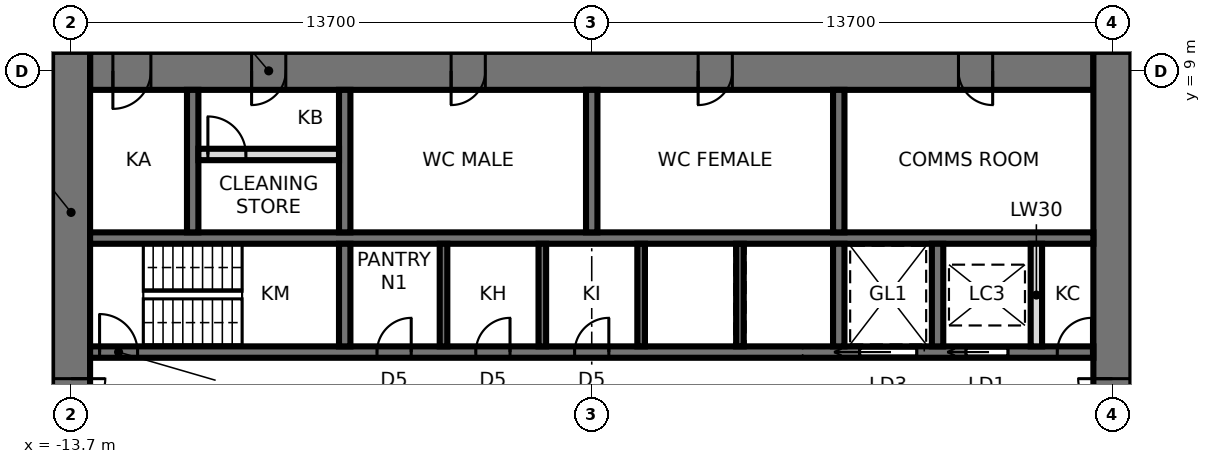
"""IFC4 building model, lengths in metres.
Left out: names, types, materials, properties, quantities, classifications, styles, units other than length and angle.
Written with IfcOpenShell. Run it as: python <this file> out.ifc"""

import sys

from ifc_helpers import new_model, si_unit, direction, frame, frame_2d, origin, place, context, subcontext, project, spatial, rectangle, extrude, element, fill, save


model = new_model("IFC4")
c1 = context("Model", 3, precision=1e-05, world=origin(), true_north=direction((0.0, 1.0)))
c2 = subcontext(c1, "Body", "Model", "MODEL_VIEW")
j1 = project(units=[si_unit("LENGTHUNIT", "METRE"), si_unit("PLANEANGLEUNIT", "RADIAN")], contexts=[c1])
p1 = place(None, origin())
s1 = spatial("IfcSite", under=j1, at=p1, CompositionType="ELEMENT")
p2 = place(p1, origin())
s2 = spatial("IfcBuilding", under=s1, at=p2, CompositionType="ELEMENT")
p3 = place(p2, frame((0.0, 0.0, 176.0)))
s3 = spatial("IfcBuildingStorey", under=s2, at=p3, CompositionType="ELEMENT", Elevation=176.0)
p4 = place(p3, frame((13.2, 9.0, 0.0), z_axis=(0.0, 0.0, 1.0), x_axis=(-1.0, 0.0, 0.0)))
e1 = element("IfcWall", 1, at=p4, inside=s3, PredefinedType="SHEAR", context=c2, shape_type="SweptSolid", body=[
    extrude(rectangle(XDim=26.4, YDim=1.0, at=frame_2d((13.2, 0.0))), origin(), (0.0, 0.0, 1.0), 3.9),
])
p5 = place(p4, frame((2.65, 0.0, 0.0)))
e2 = element("IfcOpeningElement", 2, at=p5, cuts=e1, PredefinedType="OPENING", context=c2, shape_type="SweptSolid", body=[
    extrude(rectangle(XDim=0.9, YDim=2.1, at=frame_2d((0.45, 1.05))), frame((0.0, 0.51, 0.0), z_axis=(0.0, -1.0, 0.0), x_axis=(1.0, 0.0, 0.0)), (0.0, 0.0, 1.0), 1.02),
])
p6 = place(p4, frame((9.5, 0.0, 0.0)))
e3 = element("IfcOpeningElement", 3, at=p6, cuts=e1, PredefinedType="OPENING", context=c2, shape_type="SweptSolid", body=[
    extrude(rectangle(XDim=0.9, YDim=2.1, at=frame_2d((0.45, 1.05))), frame((0.0, 0.51, 0.0), z_axis=(0.0, -1.0, 0.0), x_axis=(1.0, 0.0, 0.0)), (0.0, 0.0, 1.0), 1.02),
])
p7 = place(p4, frame((16.0, 0.0, 0.0)))
e4 = element("IfcOpeningElement", 4, at=p7, cuts=e1, PredefinedType="OPENING", context=c2, shape_type="SweptSolid", body=[
    extrude(rectangle(XDim=0.9, YDim=2.1, at=frame_2d((0.45, 1.05))), frame((0.0, 0.51, 0.0), z_axis=(0.0, -1.0, 0.0), x_axis=(1.0, 0.0, 0.0)), (0.0, 0.0, 1.0), 1.02),
])
p8 = place(p4, frame((21.25, 0.0, 0.0)))
e5 = element("IfcOpeningElement", 5, at=p8, cuts=e1, PredefinedType="OPENING", context=c2, shape_type="SweptSolid", body=[
    extrude(rectangle(XDim=0.9, YDim=2.1, at=frame_2d((0.45, 1.05))), frame((0.0, 0.51, 0.0), z_axis=(0.0, -1.0, 0.0), x_axis=(1.0, 0.0, 0.0)), (0.0, 0.0, 1.0), 1.02),
])
p9 = place(p4, frame((24.8, 0.0, 0.0)))
e6 = element("IfcOpeningElement", 6, at=p9, cuts=e1, PredefinedType="OPENING", context=c2, shape_type="SweptSolid", body=[
    extrude(rectangle(XDim=1.0, YDim=2.1, at=frame_2d((0.5, 1.05))), frame((0.0, 0.51, 0.0), z_axis=(0.0, -1.0, 0.0), x_axis=(1.0, 0.0, 0.0)), (0.0, 0.0, 1.0), 1.02),
])
p10 = place(p3, frame((13.7, -9.5, 0.0), z_axis=(0.0, 0.0, 1.0), x_axis=(0.0, 1.0, 0.0)))
e7 = element("IfcWall", 7, at=p10, inside=s3, PredefinedType="SHEAR", context=c2, shape_type="SweptSolid", body=[
    extrude(rectangle(XDim=19.0, YDim=1.0, at=frame_2d((9.5, 0.0))), origin(), (0.0, 0.0, 1.0), 3.9),
])
p11 = place(p10, frame((8.6, 0.0, 0.0)))
e8 = element("IfcOpeningElement", 8, at=p11, cuts=e7, PredefinedType="OPENING", context=c2, shape_type="SweptSolid", body=[
    extrude(rectangle(XDim=1.8, YDim=2.4, at=frame_2d((0.9, 1.2))), frame((0.0, 0.51, 0.0), z_axis=(0.0, -1.0, 0.0), x_axis=(1.0, 0.0, 0.0)), (0.0, 0.0, 1.0), 1.02),
])
p12 = place(p3, frame((-13.7, 9.5, 0.0), z_axis=(0.0, 0.0, 1.0), x_axis=(0.0, -1.0, 0.0)))
e9 = element("IfcWall", 9, at=p12, inside=s3, PredefinedType="SHEAR", context=c2, shape_type="SweptSolid", body=[
    extrude(rectangle(XDim=19.0, YDim=1.0, at=frame_2d((9.5, 0.0))), origin(), (0.0, 0.0, 1.0), 3.9),
])
p13 = place(p12, frame((8.6, 0.0, 0.0)))
e10 = element("IfcOpeningElement", 10, at=p13, cuts=e9, PredefinedType="OPENING", context=c2, shape_type="SweptSolid", body=[
    extrude(rectangle(XDim=1.8, YDim=2.4, at=frame_2d((0.9, 1.2))), frame((0.0, 0.51, 0.0), z_axis=(0.0, -1.0, 0.0), x_axis=(1.0, 0.0, 0.0)), (0.0, 0.0, 1.0), 1.02),
])
p14 = place(p3, frame((-13.2, 1.6, 0.0), z_axis=(0.0, 0.0, 1.0), x_axis=(1.0, 0.0, 0.0)))
e11 = element("IfcWall", 11, at=p14, inside=s3, PredefinedType="SHEAR", context=c2, shape_type="SweptSolid", body=[
    extrude(rectangle(XDim=26.4, YDim=0.3, at=frame_2d((13.2, 0.0))), origin(), (0.0, 0.0, 1.0), 3.9),
])
p15 = place(p14, frame((0.25, 0.0, 0.0)))
e12 = element("IfcOpeningElement", 12, at=p15, cuts=e11, PredefinedType="OPENING", context=c2, shape_type="SweptSolid", body=[
    extrude(rectangle(XDim=1.0, YDim=2.1, at=frame_2d((0.5, 1.05))), frame((0.0, 0.16, 0.0), z_axis=(0.0, -1.0, 0.0), x_axis=(1.0, 0.0, 0.0)), (0.0, 0.0, 1.0), 0.32),
])
p16 = place(p14, frame((23.05, 0.0, 0.0)))
e13 = element("IfcOpeningElement", 13, at=p16, cuts=e11, PredefinedType="OPENING", context=c2, shape_type="SweptSolid", body=[
    extrude(rectangle(XDim=1.1, YDim=2.3, at=frame_2d((0.55, 1.15))), frame((0.0, 0.16, 0.0), z_axis=(0.0, -1.0, 0.0), x_axis=(1.0, 0.0, 0.0)), (0.0, 0.0, 1.0), 0.32),
])
p17 = place(p14, frame((20.25, 0.0, 0.0)))
e14 = element("IfcOpeningElement", 14, at=p17, cuts=e11, PredefinedType="OPENING", context=c2, shape_type="SweptSolid", body=[
    extrude(rectangle(XDim=1.5, YDim=2.4, at=frame_2d((0.75, 1.2))), frame((0.0, 0.16, 0.0), z_axis=(0.0, -1.0, 0.0), x_axis=(1.0, 0.0, 0.0)), (0.0, 0.0, 1.0), 0.32),
])
p18 = place(p14, frame((7.55, 0.0, 0.0)))
e15 = element("IfcOpeningElement", 15, at=p18, cuts=e11, PredefinedType="OPENING", context=c2, shape_type="SweptSolid", body=[
    extrude(rectangle(XDim=0.9, YDim=2.1, at=frame_2d((0.45, 1.05))), frame((0.0, 0.16, 0.0), z_axis=(0.0, -1.0, 0.0), x_axis=(1.0, 0.0, 0.0)), (0.0, 0.0, 1.0), 0.32),
])
p19 = place(p14, frame((10.15, 0.0, 0.0)))
e16 = element("IfcOpeningElement", 16, at=p19, cuts=e11, PredefinedType="OPENING", context=c2, shape_type="SweptSolid", body=[
    extrude(rectangle(XDim=0.9, YDim=2.1, at=frame_2d((0.45, 1.05))), frame((0.0, 0.16, 0.0), z_axis=(0.0, -1.0, 0.0), x_axis=(1.0, 0.0, 0.0)), (0.0, 0.0, 1.0), 0.32),
])
p20 = place(p14, frame((12.75, 0.0, 0.0)))
e17 = element("IfcOpeningElement", 17, at=p20, cuts=e11, PredefinedType="OPENING", context=c2, shape_type="SweptSolid", body=[
    extrude(rectangle(XDim=0.9, YDim=2.1, at=frame_2d((0.45, 1.05))), frame((0.0, 0.16, 0.0), z_axis=(0.0, -1.0, 0.0), x_axis=(1.0, 0.0, 0.0)), (0.0, 0.0, 1.0), 0.32),
])
p21 = place(p14, frame((25.45, 0.0, 0.0)))
e18 = element("IfcOpeningElement", 18, at=p21, cuts=e11, PredefinedType="OPENING", context=c2, shape_type="SweptSolid", body=[
    extrude(rectangle(XDim=0.9, YDim=2.1, at=frame_2d((0.45, 1.05))), frame((0.0, 0.16, 0.0), z_axis=(0.0, -1.0, 0.0), x_axis=(1.0, 0.0, 0.0)), (0.0, 0.0, 1.0), 0.32),
])
p22 = place(p3, frame((-13.2, 4.6, 0.0), z_axis=(0.0, 0.0, 1.0), x_axis=(1.0, 0.0, 0.0)))
e19 = element("IfcWall", 19, at=p22, inside=s3, PredefinedType="SHEAR", context=c2, shape_type="SweptSolid", body=[
    extrude(rectangle(XDim=26.4, YDim=0.3, at=frame_2d((13.2, 0.0))), origin(), (0.0, 0.0, 1.0), 3.9),
])
p23 = place(p3, frame((-6.5, 1.75, 0.0), z_axis=(0.0, 0.0, 1.0), x_axis=(0.0, 1.0, 0.0)))
e20 = element("IfcWall", 20, at=p23, inside=s3, PredefinedType="SHEAR", context=c2, shape_type="SweptSolid", body=[
    extrude(rectangle(XDim=2.7, YDim=0.3, at=frame_2d((1.35, 0.0))), origin(), (0.0, 0.0, 1.0), 3.9),
])
p24 = place(p3, frame((-6.5, 4.75, 0.0), z_axis=(0.0, 0.0, 1.0), x_axis=(0.0, 1.0, 0.0)))
e21 = element("IfcWall", 21, at=p24, inside=s3, PredefinedType="SHEAR", context=c2, shape_type="SweptSolid", body=[
    extrude(rectangle(XDim=3.75, YDim=0.3, at=frame_2d((1.875, 0.0))), origin(), (0.0, 0.0, 1.0), 3.9),
])
p25 = place(p3, frame((6.5, 1.75, 0.0), z_axis=(0.0, 0.0, 1.0), x_axis=(0.0, 1.0, 0.0)))
e22 = element("IfcWall", 22, at=p25, inside=s3, PredefinedType="SHEAR", context=c2, shape_type="SweptSolid", body=[
    extrude(rectangle(XDim=2.7, YDim=0.3, at=frame_2d((1.35, 0.0))), origin(), (0.0, 0.0, 1.0), 3.9),
])
p26 = place(p3, frame((6.5, 4.75, 0.0), z_axis=(0.0, 0.0, 1.0), x_axis=(0.0, 1.0, 0.0)))
e23 = element("IfcWall", 23, at=p26, inside=s3, PredefinedType="SHEAR", context=c2, shape_type="SweptSolid", body=[
    extrude(rectangle(XDim=3.75, YDim=0.3, at=frame_2d((1.875, 0.0))), origin(), (0.0, 0.0, 1.0), 3.9),
])
for number, where, z_axis, x_axis in (
    (24, (-3.9, 1.75, 0.0), (0.0, 0.0, 1.0), (0.0, 1.0, 0.0)),
    (25, (-1.3, 1.75, 0.0), (0.0, 0.0, 1.0), (0.0, 1.0, 0.0)),
    (26, (1.3, 1.75, 0.0), (0.0, 0.0, 1.0), (0.0, 1.0, 0.0)),
    (27, (3.9, 1.75, 0.0), (0.0, 0.0, 1.0), (0.0, 1.0, 0.0)),
):
    element("IfcWall", number, at=place(p3, frame(where, z_axis=z_axis, x_axis=x_axis)), inside=s3, PredefinedType="SHEAR", context=c2, shape_type="SweptSolid", body=[
        extrude(rectangle(XDim=2.7, YDim=0.2, at=frame_2d((1.35, 0.0))), origin(), (0.0, 0.0, 1.0), 3.9),
    ])
for number, where, z_axis, x_axis in (
    (28, (0.0, 4.75, 0.0), (0.0, 0.0, 1.0), (0.0, 1.0, 0.0)),
    (29, (-10.5, 4.75, 0.0), (0.0, 0.0, 1.0), (0.0, 1.0, 0.0)),
):
    element("IfcWall", number, at=place(p3, frame(where, z_axis=z_axis, x_axis=x_axis)), inside=s3, PredefinedType="SHEAR", context=c2, shape_type="SweptSolid", body=[
        extrude(rectangle(XDim=3.75, YDim=0.3, at=frame_2d((1.875, 0.0))), origin(), (0.0, 0.0, 1.0), 3.9),
    ])
p27 = place(p3, frame((9.1, 1.75, 0.0), z_axis=(0.0, 0.0, 1.0), x_axis=(0.0, 1.0, 0.0)))
e30 = element("IfcWall", 30, at=p27, inside=s3, PredefinedType="SHEAR", context=c2, shape_type="SweptSolid", body=[
    extrude(rectangle(XDim=2.7, YDim=0.3, at=frame_2d((1.35, 0.0))), origin(), (0.0, 0.0, 1.0), 3.9),
])
p28 = place(p3, frame((-10.35, 6.8, 0.0), z_axis=(0.0, 0.0, 1.0), x_axis=(1.0, 0.0, 0.0)))
e31 = element("IfcWall", 31, at=p28, inside=s3, PredefinedType="PARTITIONING", context=c2, shape_type="SweptSolid", body=[
    extrude(rectangle(XDim=3.7, YDim=0.3, at=frame_2d((1.85, 0.0))), origin(), (0.0, 0.0, 1.0), 3.74),
])
p29 = place(p28, frame((0.25, 0.0, 0.0)))
e32 = element("IfcOpeningElement", 32, at=p29, cuts=e31, PredefinedType="OPENING", context=c2, shape_type="SweptSolid", body=[
    extrude(rectangle(XDim=1.0, YDim=2.4, at=frame_2d((0.5, 1.2))), frame((0.0, 0.16, 0.0), z_axis=(0.0, -1.0, 0.0), x_axis=(1.0, 0.0, 0.0)), (0.0, 0.0, 1.0), 0.32),
])
p30 = place(p3, frame((11.7, 1.75, 0.0), z_axis=(0.0, 0.0, 1.0), x_axis=(0.0, 1.0, 0.0)))
e33 = element("IfcWall", 33, at=p30, inside=s3, PredefinedType="SOLIDWALL", context=c2, shape_type="SweptSolid", body=[
    extrude(rectangle(XDim=2.7, YDim=0.3, at=frame_2d((1.35, 0.0))), origin(), (0.0, 0.0, 1.0), 3.74),
])
p31 = place(p13, origin())
e34 = element("IfcDoor", 34, at=p31, inside=s3, OperationType="DOUBLE_DOOR_SINGLE_SWING", PredefinedType="DOOR", context=c2, shape_type="SweptSolid", body=[
    extrude(rectangle(XDim=1.72, YDim=2.36, at=frame_2d((0.9, 1.18))), frame((0.0, 0.025, 0.0), z_axis=(0.0, -1.0, 0.0), x_axis=(1.0, 0.0, 0.0)), (0.0, 0.0, 1.0), 0.05),
    extrude(rectangle(XDim=0.04, YDim=2.4, at=frame_2d((0.02, 1.2))), frame((0.0, 0.25, 0.0), z_axis=(0.0, -1.0, 0.0), x_axis=(1.0, 0.0, 0.0)), (0.0, 0.0, 1.0), 0.5),
    extrude(rectangle(XDim=0.04, YDim=2.4, at=frame_2d((1.78, 1.2))), frame((0.0, 0.25, 0.0), z_axis=(0.0, -1.0, 0.0), x_axis=(1.0, 0.0, 0.0)), (0.0, 0.0, 1.0), 0.5),
    extrude(rectangle(XDim=1.72, YDim=0.04, at=frame_2d((0.9, 2.38))), frame((0.0, 0.25, 0.0), z_axis=(0.0, -1.0, 0.0), x_axis=(1.0, 0.0, 0.0)), (0.0, 0.0, 1.0), 0.5),
])
fill(e10, e34)
p32 = place(p11, origin())
e35 = element("IfcDoor", 35, at=p32, inside=s3, OperationType="DOUBLE_DOOR_SINGLE_SWING", PredefinedType="DOOR", context=c2, shape_type="SweptSolid", body=[
    extrude(rectangle(XDim=1.72, YDim=2.36, at=frame_2d((0.9, 1.18))), frame((0.0, 0.025, 0.0), z_axis=(0.0, -1.0, 0.0), x_axis=(1.0, 0.0, 0.0)), (0.0, 0.0, 1.0), 0.05),
    extrude(rectangle(XDim=0.04, YDim=2.4, at=frame_2d((0.02, 1.2))), frame((0.0, 0.25, 0.0), z_axis=(0.0, -1.0, 0.0), x_axis=(1.0, 0.0, 0.0)), (0.0, 0.0, 1.0), 0.5),
    extrude(rectangle(XDim=0.04, YDim=2.4, at=frame_2d((1.78, 1.2))), frame((0.0, 0.25, 0.0), z_axis=(0.0, -1.0, 0.0), x_axis=(1.0, 0.0, 0.0)), (0.0, 0.0, 1.0), 0.5),
    extrude(rectangle(XDim=1.72, YDim=0.04, at=frame_2d((0.9, 2.38))), frame((0.0, 0.25, 0.0), z_axis=(0.0, -1.0, 0.0), x_axis=(1.0, 0.0, 0.0)), (0.0, 0.0, 1.0), 0.5),
])
fill(e8, e35)
p33 = place(p15, origin())
e36 = element("IfcDoor", 36, at=p33, inside=s3, OperationType="SINGLE_SWING_LEFT", PredefinedType="DOOR", context=c2, shape_type="SweptSolid", body=[
    extrude(rectangle(XDim=1.0, YDim=2.1, at=frame_2d((0.5, 1.05))), frame((0.0, 0.025, 0.0), z_axis=(0.0, -1.0, 0.0), x_axis=(1.0, 0.0, 0.0)), (0.0, 0.0, 1.0), 0.05),
])
fill(e12, e36)
p34 = place(p16, origin())
e37 = element("IfcDoor", 37, at=p34, inside=s3, OperationType="SLIDING_TO_LEFT", PredefinedType="DOOR", context=c2, shape_type="SweptSolid", body=[
    extrude(rectangle(XDim=1.1, YDim=2.3, at=frame_2d((0.55, 1.15))), frame((0.0, 0.025, 0.0), z_axis=(0.0, -1.0, 0.0), x_axis=(1.0, 0.0, 0.0)), (0.0, 0.0, 1.0), 0.05),
])
fill(e13, e37)
p35 = place(p17, origin())
e38 = element("IfcDoor", 38, at=p35, inside=s3, OperationType="SLIDING_TO_LEFT", PredefinedType="DOOR", context=c2, shape_type="SweptSolid", body=[
    extrude(rectangle(XDim=1.5, YDim=2.4, at=frame_2d((0.75, 1.2))), frame((0.0, 0.025, 0.0), z_axis=(0.0, -1.0, 0.0), x_axis=(1.0, 0.0, 0.0)), (0.0, 0.0, 1.0), 0.05),
])
fill(e14, e38)
p36 = place(p18, origin())
e39 = element("IfcDoor", 39, at=p36, inside=s3, OperationType="SINGLE_SWING_RIGHT", PredefinedType="DOOR", context=c2, shape_type="SweptSolid", body=[
    extrude(rectangle(XDim=0.9, YDim=2.1, at=frame_2d((0.45, 1.05))), frame((0.0, 0.025, 0.0), z_axis=(0.0, -1.0, 0.0), x_axis=(1.0, 0.0, 0.0)), (0.0, 0.0, 1.0), 0.05),
])
fill(e15, e39)
p37 = place(p19, origin())
e40 = element("IfcDoor", 40, at=p37, inside=s3, OperationType="SINGLE_SWING_RIGHT", PredefinedType="DOOR", context=c2, shape_type="SweptSolid", body=[
    extrude(rectangle(XDim=0.9, YDim=2.1, at=frame_2d((0.45, 1.05))), frame((0.0, 0.025, 0.0), z_axis=(0.0, -1.0, 0.0), x_axis=(1.0, 0.0, 0.0)), (0.0, 0.0, 1.0), 0.05),
])
fill(e16, e40)
p38 = place(p20, origin())
e41 = element("IfcDoor", 41, at=p38, inside=s3, OperationType="SINGLE_SWING_RIGHT", PredefinedType="DOOR", context=c2, shape_type="SweptSolid", body=[
    extrude(rectangle(XDim=0.9, YDim=2.1, at=frame_2d((0.45, 1.05))), frame((0.0, 0.025, 0.0), z_axis=(0.0, -1.0, 0.0), x_axis=(1.0, 0.0, 0.0)), (0.0, 0.0, 1.0), 0.05),
])
fill(e17, e41)
p39 = place(p21, origin())
e42 = element("IfcDoor", 42, at=p39, inside=s3, OperationType="SINGLE_SWING_RIGHT", PredefinedType="DOOR", context=c2, shape_type="SweptSolid", body=[
    extrude(rectangle(XDim=0.9, YDim=2.1, at=frame_2d((0.45, 1.05))), frame((0.0, 0.025, 0.0), z_axis=(0.0, -1.0, 0.0), x_axis=(1.0, 0.0, 0.0)), (0.0, 0.0, 1.0), 0.05),
])
fill(e18, e42)
p40 = place(p5, origin())
e43 = element("IfcDoor", 43, at=p40, inside=s3, OperationType="SINGLE_SWING_LEFT", PredefinedType="DOOR", context=c2, shape_type="SweptSolid", body=[
    extrude(rectangle(XDim=0.82, YDim=2.06, at=frame_2d((0.45, 1.03))), frame((0.0, 0.025, 0.0), z_axis=(0.0, -1.0, 0.0), x_axis=(1.0, 0.0, 0.0)), (0.0, 0.0, 1.0), 0.05),
    extrude(rectangle(XDim=0.04, YDim=2.1, at=frame_2d((0.02, 1.05))), frame((0.0, 0.25, 0.0), z_axis=(0.0, -1.0, 0.0), x_axis=(1.0, 0.0, 0.0)), (0.0, 0.0, 1.0), 0.5),
    extrude(rectangle(XDim=0.04, YDim=2.1, at=frame_2d((0.88, 1.05))), frame((0.0, 0.25, 0.0), z_axis=(0.0, -1.0, 0.0), x_axis=(1.0, 0.0, 0.0)), (0.0, 0.0, 1.0), 0.5),
    extrude(rectangle(XDim=0.82, YDim=0.04, at=frame_2d((0.45, 2.08))), frame((0.0, 0.25, 0.0), z_axis=(0.0, -1.0, 0.0), x_axis=(1.0, 0.0, 0.0)), (0.0, 0.0, 1.0), 0.5),
])
fill(e2, e43)
p41 = place(p6, origin())
e44 = element("IfcDoor", 44, at=p41, inside=s3, OperationType="SINGLE_SWING_RIGHT", PredefinedType="DOOR", context=c2, shape_type="SweptSolid", body=[
    extrude(rectangle(XDim=0.82, YDim=2.06, at=frame_2d((0.45, 1.03))), frame((0.0, 0.025, 0.0), z_axis=(0.0, -1.0, 0.0), x_axis=(1.0, 0.0, 0.0)), (0.0, 0.0, 1.0), 0.05),
    extrude(rectangle(XDim=0.04, YDim=2.1, at=frame_2d((0.02, 1.05))), frame((0.0, 0.25, 0.0), z_axis=(0.0, -1.0, 0.0), x_axis=(1.0, 0.0, 0.0)), (0.0, 0.0, 1.0), 0.5),
    extrude(rectangle(XDim=0.04, YDim=2.1, at=frame_2d((0.88, 1.05))), frame((0.0, 0.25, 0.0), z_axis=(0.0, -1.0, 0.0), x_axis=(1.0, 0.0, 0.0)), (0.0, 0.0, 1.0), 0.5),
    extrude(rectangle(XDim=0.82, YDim=0.04, at=frame_2d((0.45, 2.08))), frame((0.0, 0.25, 0.0), z_axis=(0.0, -1.0, 0.0), x_axis=(1.0, 0.0, 0.0)), (0.0, 0.0, 1.0), 0.5),
])
fill(e3, e44)
p42 = place(p7, origin())
e45 = element("IfcDoor", 45, at=p42, inside=s3, OperationType="SINGLE_SWING_RIGHT", PredefinedType="DOOR", context=c2, shape_type="SweptSolid", body=[
    extrude(rectangle(XDim=0.82, YDim=2.06, at=frame_2d((0.45, 1.03))), frame((0.0, 0.025, 0.0), z_axis=(0.0, -1.0, 0.0), x_axis=(1.0, 0.0, 0.0)), (0.0, 0.0, 1.0), 0.05),
    extrude(rectangle(XDim=0.04, YDim=2.1, at=frame_2d((0.02, 1.05))), frame((0.0, 0.25, 0.0), z_axis=(0.0, -1.0, 0.0), x_axis=(1.0, 0.0, 0.0)), (0.0, 0.0, 1.0), 0.5),
    extrude(rectangle(XDim=0.04, YDim=2.1, at=frame_2d((0.88, 1.05))), frame((0.0, 0.25, 0.0), z_axis=(0.0, -1.0, 0.0), x_axis=(1.0, 0.0, 0.0)), (0.0, 0.0, 1.0), 0.5),
    extrude(rectangle(XDim=0.82, YDim=0.04, at=frame_2d((0.45, 2.08))), frame((0.0, 0.25, 0.0), z_axis=(0.0, -1.0, 0.0), x_axis=(1.0, 0.0, 0.0)), (0.0, 0.0, 1.0), 0.5),
])
fill(e4, e45)
p43 = place(p8, origin())
e46 = element("IfcDoor", 46, at=p43, inside=s3, OperationType="SINGLE_SWING_RIGHT", PredefinedType="DOOR", context=c2, shape_type="SweptSolid", body=[
    extrude(rectangle(XDim=0.82, YDim=2.06, at=frame_2d((0.45, 1.03))), frame((0.0, 0.025, 0.0), z_axis=(0.0, -1.0, 0.0), x_axis=(1.0, 0.0, 0.0)), (0.0, 0.0, 1.0), 0.05),
    extrude(rectangle(XDim=0.04, YDim=2.1, at=frame_2d((0.02, 1.05))), frame((0.0, 0.25, 0.0), z_axis=(0.0, -1.0, 0.0), x_axis=(1.0, 0.0, 0.0)), (0.0, 0.0, 1.0), 0.5),
    extrude(rectangle(XDim=0.04, YDim=2.1, at=frame_2d((0.88, 1.05))), frame((0.0, 0.25, 0.0), z_axis=(0.0, -1.0, 0.0), x_axis=(1.0, 0.0, 0.0)), (0.0, 0.0, 1.0), 0.5),
    extrude(rectangle(XDim=0.82, YDim=0.04, at=frame_2d((0.45, 2.08))), frame((0.0, 0.25, 0.0), z_axis=(0.0, -1.0, 0.0), x_axis=(1.0, 0.0, 0.0)), (0.0, 0.0, 1.0), 0.5),
])
fill(e5, e46)
p44 = place(p9, origin())
e47 = element("IfcDoor", 47, at=p44, inside=s3, OperationType="SINGLE_SWING_RIGHT", PredefinedType="DOOR", context=c2, shape_type="SweptSolid", body=[
    extrude(rectangle(XDim=0.92, YDim=2.06, at=frame_2d((0.5, 1.03))), frame((0.0, 0.025, 0.0), z_axis=(0.0, -1.0, 0.0), x_axis=(1.0, 0.0, 0.0)), (0.0, 0.0, 1.0), 0.05),
    extrude(rectangle(XDim=0.04, YDim=2.1, at=frame_2d((0.02, 1.05))), frame((0.0, 0.25, 0.0), z_axis=(0.0, -1.0, 0.0), x_axis=(1.0, 0.0, 0.0)), (0.0, 0.0, 1.0), 0.5),
    extrude(rectangle(XDim=0.04, YDim=2.1, at=frame_2d((0.98, 1.05))), frame((0.0, 0.25, 0.0), z_axis=(0.0, -1.0, 0.0), x_axis=(1.0, 0.0, 0.0)), (0.0, 0.0, 1.0), 0.5),
    extrude(rectangle(XDim=0.92, YDim=0.04, at=frame_2d((0.5, 2.08))), frame((0.0, 0.25, 0.0), z_axis=(0.0, -1.0, 0.0), x_axis=(1.0, 0.0, 0.0)), (0.0, 0.0, 1.0), 0.5),
])
fill(e6, e47)
p45 = place(p29, origin())
e48 = element("IfcDoor", 48, at=p45, inside=s3, OperationType="SINGLE_SWING_LEFT", PredefinedType="DOOR", context=c2, shape_type="SweptSolid", body=[
    extrude(rectangle(XDim=1.0, YDim=2.4, at=frame_2d((0.5, 1.2))), frame((0.0, 0.025, 0.0), z_axis=(0.0, -1.0, 0.0), x_axis=(1.0, 0.0, 0.0)), (0.0, 0.0, 1.0), 0.05),
])
fill(e32, e48)
save(model, sys.argv[1])
